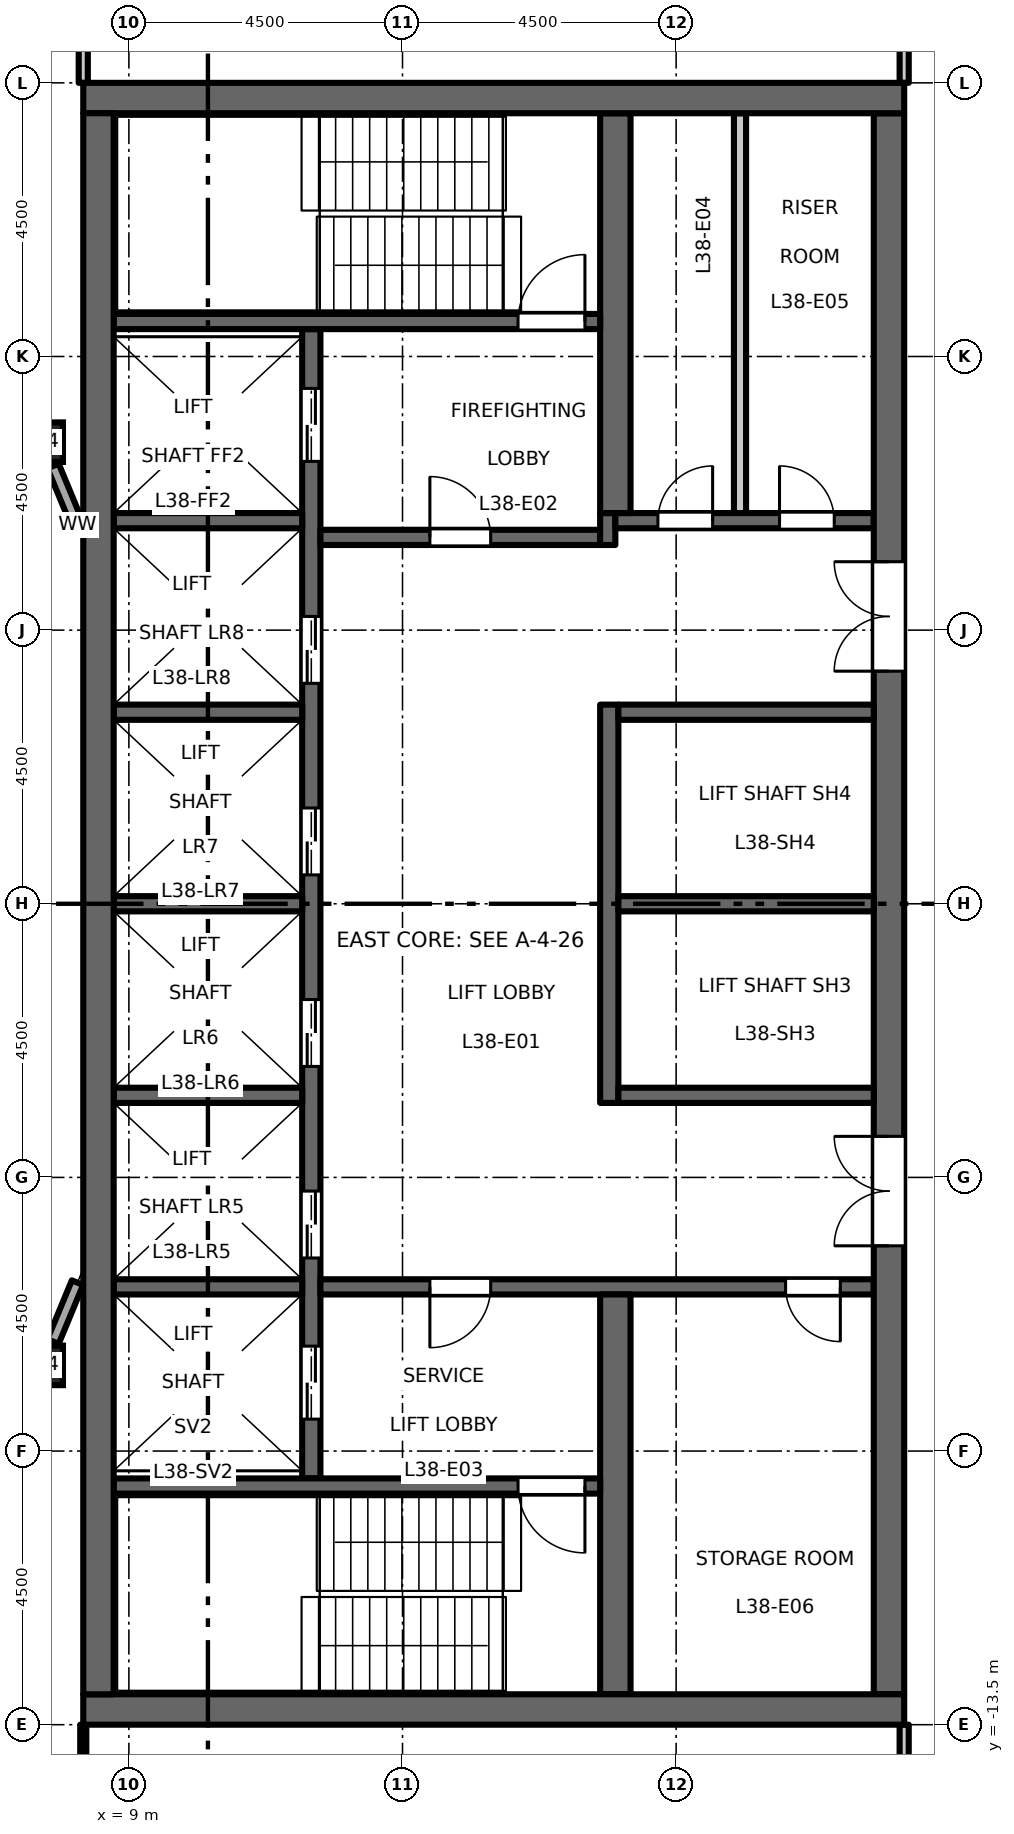
"""IFC4 building model, lengths in metres.
Left out: names, types, materials, properties, quantities, classifications, styles, units other than length and angle.
Written with IfcOpenShell. Run it as: python <this file> out.ifc"""

import sys

from ifc_helpers import new_model, si_unit, direction, frame, frame_2d, origin, origin_2d, place, context, subcontext, project, spatial, rectangle, hollow_rectangle, extrude, element, fill, save


model = new_model("IFC4")
c1 = context("Model", 3, precision=1e-05, world=origin(), true_north=direction((0.0, 1.0)))
c2 = subcontext(c1, "Body", "Model", "MODEL_VIEW")
j1 = project(units=[si_unit("LENGTHUNIT", "METRE"), si_unit("PLANEANGLEUNIT", "RADIAN")], contexts=[c1])
p1 = place(None, origin())
s1 = spatial("IfcSite", under=j1, at=p1, CompositionType="ELEMENT")
p2 = place(p1, origin())
s2 = spatial("IfcBuilding", under=s1, at=p2, CompositionType="ELEMENT")
p3 = place(p2, frame((0.0, 0.0, 176.7)))
s3 = spatial("IfcBuildingStorey", under=s2, at=p3, CompositionType="ELEMENT", Elevation=176.7)
for number, where, z_axis, x_axis in (
    (1, (7.591, -7.591, 0.0), (0.0, 0.0, 1.0), (1.0, 0.0, 0.0)),
    (2, (7.591, 7.591, 0.0), (0.0, 0.0, 1.0), (1.0, 0.0, 0.0)),
):
    element("IfcColumn", number, at=place(p3, frame(where, z_axis=z_axis, x_axis=x_axis)), inside=s3, PredefinedType="COLUMN", context=c2, shape_type="SweptSolid", body=[
        extrude(hollow_rectangle(XDim=0.65, YDim=0.65, WallThickness=0.036, at=origin_2d()), origin(), (0.0, 0.0, 1.0), 4.5),
    ])
p4 = place(p3, frame((12.0, -9.45, 0.0), z_axis=(0.0, 0.0, 1.0), x_axis=(0.0, 1.0, 0.0)))
e3 = element("IfcWall", 3, at=p4, inside=s3, PredefinedType="SHEAR", context=c2, shape_type="SweptSolid", body=[
    extrude(rectangle(XDim=18.9, YDim=0.3, at=frame_2d((9.45, 0.0))), origin(), (0.0, 0.0, 1.0), 4.3),
])
p5 = place(p4, frame((3.625, 0.0, 0.0)))
e4 = element("IfcOpeningElement", 4, at=p5, cuts=e3, PredefinedType="OPENING", context=c2, shape_type="SweptSolid", body=[
    extrude(rectangle(XDim=1.1, YDim=2.1, at=frame_2d((0.55, 1.05))), frame((0.0, 0.16, 0.0), z_axis=(0.0, -1.0, 0.0), x_axis=(1.0, 0.0, 0.0)), (0.0, 0.0, 1.0), 0.32),
])
p6 = place(p4, frame((6.775, 0.0, 0.0)))
e5 = element("IfcOpeningElement", 5, at=p6, cuts=e3, PredefinedType="OPENING", context=c2, shape_type="SweptSolid", body=[
    extrude(rectangle(XDim=1.1, YDim=2.1, at=frame_2d((0.55, 1.05))), frame((0.0, 0.16, 0.0), z_axis=(0.0, -1.0, 0.0), x_axis=(1.0, 0.0, 0.0)), (0.0, 0.0, 1.0), 0.32),
])
p7 = place(p4, frame((9.925, 0.0, 0.0)))
e6 = element("IfcOpeningElement", 6, at=p7, cuts=e3, PredefinedType="OPENING", context=c2, shape_type="SweptSolid", body=[
    extrude(rectangle(XDim=1.1, YDim=2.1, at=frame_2d((0.55, 1.05))), frame((0.0, 0.16, 0.0), z_axis=(0.0, -1.0, 0.0), x_axis=(1.0, 0.0, 0.0)), (0.0, 0.0, 1.0), 0.32),
])
p8 = place(p4, frame((13.075, 0.0, 0.0)))
e7 = element("IfcOpeningElement", 7, at=p8, cuts=e3, PredefinedType="OPENING", context=c2, shape_type="SweptSolid", body=[
    extrude(rectangle(XDim=1.1, YDim=2.1, at=frame_2d((0.55, 1.05))), frame((0.0, 0.16, 0.0), z_axis=(0.0, -1.0, 0.0), x_axis=(1.0, 0.0, 0.0)), (0.0, 0.0, 1.0), 0.32),
])
p9 = place(p4, frame((16.725, 0.0, 0.0)))
e8 = element("IfcOpeningElement", 8, at=p9, cuts=e3, PredefinedType="OPENING", context=c2, shape_type="SweptSolid", body=[
    extrude(rectangle(XDim=1.2, YDim=2.1, at=frame_2d((0.6, 1.05))), frame((0.0, 0.16, 0.0), z_axis=(0.0, -1.0, 0.0), x_axis=(1.0, 0.0, 0.0)), (0.0, 0.0, 1.0), 0.32),
])
p10 = place(p4, frame((0.975, 0.0, 0.0)))
e9 = element("IfcOpeningElement", 9, at=p10, cuts=e3, PredefinedType="OPENING", context=c2, shape_type="SweptSolid", body=[
    extrude(rectangle(XDim=1.2, YDim=2.1, at=frame_2d((0.6, 1.05))), frame((0.0, 0.16, 0.0), z_axis=(0.0, -1.0, 0.0), x_axis=(1.0, 0.0, 0.0)), (0.0, 0.0, 1.0), 0.32),
])
p11 = place(p3, frame((12.15, 6.025, 0.0), z_axis=(0.0, 0.0, 1.0), x_axis=(1.0, 0.0, 0.0)))
e10 = element("IfcWall", 10, at=p11, inside=s3, PredefinedType="SHEAR", context=c2, shape_type="SweptSolid", body=[
    extrude(rectangle(XDim=4.6, YDim=0.25, at=frame_2d((2.3, 0.0))), origin(), (0.0, 0.0, 1.0), 4.3),
])
p12 = place(p11, frame((1.8, 0.0, 0.0)))
e11 = element("IfcOpeningElement", 11, at=p12, cuts=e10, PredefinedType="OPENING", context=c2, shape_type="SweptSolid", body=[
    extrude(rectangle(XDim=1.0, YDim=2.1, at=frame_2d((0.5, 1.05))), frame((0.0, 0.135, 0.0), z_axis=(0.0, -1.0, 0.0), x_axis=(1.0, 0.0, 0.0)), (0.0, 0.0, 1.0), 0.27),
])
p13 = place(p3, frame((16.875, 5.9, 0.0), z_axis=(0.0, 0.0, 1.0), x_axis=(0.0, 1.0, 0.0)))
e12 = element("IfcWall", 12, at=p13, inside=s3, PredefinedType="SHEAR", context=c2, shape_type="SweptSolid", body=[
    extrude(rectangle(XDim=0.525, YDim=0.25, at=frame_2d((0.263, 0.0))), origin(), (0.0, 0.0, 1.0), 4.3),
])
p14 = place(p3, frame((17.0, 6.3, 0.0), z_axis=(0.0, 0.0, 1.0), x_axis=(1.0, 0.0, 0.0)))
e13 = element("IfcWall", 13, at=p14, inside=s3, PredefinedType="SHEAR", context=c2, shape_type="SweptSolid", body=[
    extrude(rectangle(XDim=4.25, YDim=0.25, at=frame_2d((2.125, 0.0))), origin(), (0.0, 0.0, 1.0), 4.3),
])
p15 = place(p14, frame((0.7, 0.0, 0.0)))
e14 = element("IfcOpeningElement", 14, at=p15, cuts=e13, PredefinedType="OPENING", context=c2, shape_type="SweptSolid", body=[
    extrude(rectangle(XDim=0.9, YDim=2.1, at=frame_2d((0.45, 1.05))), frame((0.0, 0.135, 0.0), z_axis=(0.0, -1.0, 0.0), x_axis=(1.0, 0.0, 0.0)), (0.0, 0.0, 1.0), 0.27),
])
p16 = place(p14, frame((2.7, 0.0, 0.0)))
e15 = element("IfcOpeningElement", 15, at=p16, cuts=e13, PredefinedType="OPENING", context=c2, shape_type="SweptSolid", body=[
    extrude(rectangle(XDim=0.9, YDim=2.1, at=frame_2d((0.45, 1.05))), frame((0.0, 0.135, 0.0), z_axis=(0.0, -1.0, 0.0), x_axis=(1.0, 0.0, 0.0)), (0.0, 0.0, 1.0), 0.27),
])
p17 = place(p3, frame((12.15, -6.3, 0.0), z_axis=(0.0, 0.0, 1.0), x_axis=(1.0, 0.0, 0.0)))
e16 = element("IfcWall", 16, at=p17, inside=s3, PredefinedType="SHEAR", context=c2, shape_type="SweptSolid", body=[
    extrude(rectangle(XDim=9.1, YDim=0.25, at=frame_2d((4.55, 0.0))), origin(), (0.0, 0.0, 1.0), 4.3),
])
p18 = place(p17, frame((1.8, 0.0, 0.0)))
e17 = element("IfcOpeningElement", 17, at=p18, cuts=e16, PredefinedType="OPENING", context=c2, shape_type="SweptSolid", body=[
    extrude(rectangle(XDim=1.0, YDim=2.1, at=frame_2d((0.5, 1.05))), frame((0.0, 0.135, 0.0), z_axis=(0.0, -1.0, 0.0), x_axis=(1.0, 0.0, 0.0)), (0.0, 0.0, 1.0), 0.27),
])
p19 = place(p17, frame((7.65, 0.0, 0.0)))
e18 = element("IfcOpeningElement", 18, at=p19, cuts=e16, PredefinedType="OPENING", context=c2, shape_type="SweptSolid", body=[
    extrude(rectangle(XDim=0.9, YDim=2.1, at=frame_2d((0.45, 1.05))), frame((0.0, 0.135, 0.0), z_axis=(0.0, -1.0, 0.0), x_axis=(1.0, 0.0, 0.0)), (0.0, 0.0, 1.0), 0.27),
])
p20 = place(p3, frame((21.5, -13.0, 0.0), z_axis=(0.0, 0.0, 1.0), x_axis=(0.0, 1.0, 0.0)))
e19 = element("IfcWall", 19, at=p20, inside=s3, PredefinedType="SHEAR", context=c2, shape_type="SweptSolid", body=[
    extrude(rectangle(XDim=26.0, YDim=0.5, at=frame_2d((13.0, 0.0))), origin(), (0.0, 0.0, 1.0), 4.3),
])
p21 = place(p20, frame((16.825, 0.0, 0.0)))
e20 = element("IfcOpeningElement", 20, at=p21, cuts=e19, PredefinedType="OPENING", context=c2, shape_type="SweptSolid", body=[
    extrude(rectangle(XDim=1.8, YDim=2.1, at=frame_2d((0.9, 1.05))), frame((0.0, 0.26, 0.0), z_axis=(0.0, -1.0, 0.0), x_axis=(1.0, 0.0, 0.0)), (0.0, 0.0, 1.0), 0.52),
])
p22 = place(p20, frame((7.375, 0.0, 0.0)))
e21 = element("IfcOpeningElement", 21, at=p22, cuts=e19, PredefinedType="OPENING", context=c2, shape_type="SweptSolid", body=[
    extrude(rectangle(XDim=1.8, YDim=2.1, at=frame_2d((0.9, 1.05))), frame((0.0, 0.26, 0.0), z_axis=(0.0, -1.0, 0.0), x_axis=(1.0, 0.0, 0.0)), (0.0, 0.0, 1.0), 0.52),
])
p23 = place(p3, frame((19.05, 6.425, 0.0), z_axis=(0.0, 0.0, 1.0), x_axis=(0.0, 1.0, 0.0)))
e22 = element("IfcWall", 22, at=p23, inside=s3, PredefinedType="PARTITIONING", context=c2, shape_type="SweptSolid", body=[
    extrude(rectangle(XDim=6.575, YDim=0.2, at=frame_2d((3.288, 0.0))), origin(), (0.0, 0.0, 1.0), 4.3),
])
p24 = place(p3, frame((16.9, -3.275, 0.0), z_axis=(0.0, 0.0, 1.0), x_axis=(0.0, 1.0, 0.0)))
e23 = element("IfcWall", 23, at=p24, inside=s3, PredefinedType="SHEAR", context=c2, shape_type="SweptSolid", body=[
    extrude(rectangle(XDim=6.55, YDim=0.3, at=frame_2d((3.275, 0.0))), origin(), (0.0, 0.0, 1.0), 4.3),
])
for number, where, z_axis, x_axis in (
    (24, (17.05, 0.0, 0.0), (0.0, 0.0, 1.0), (1.0, 0.0, 0.0)),
    (25, (17.05, 3.15, 0.0), (0.0, 0.0, 1.0), (1.0, 0.0, 0.0)),
    (26, (17.05, -3.15, 0.0), (0.0, 0.0, 1.0), (1.0, 0.0, 0.0)),
):
    element("IfcWall", number, at=place(p3, frame(where, z_axis=z_axis, x_axis=x_axis)), inside=s3, PredefinedType="SHEAR", context=c2, shape_type="SweptSolid", body=[
        extrude(rectangle(XDim=4.2, YDim=0.25, at=frame_2d((2.1, 0.0))), origin(), (0.0, 0.0, 1.0), 4.3),
    ])
for number, where, z_axis, x_axis in (
    (27, (17.0, 6.425, 0.0), (0.0, 0.0, 1.0), (0.0, 1.0, 0.0)),
    (28, (17.0, -13.0, 0.0), (0.0, 0.0, 1.0), (0.0, 1.0, 0.0)),
):
    element("IfcWall", number, at=place(p3, frame(where, z_axis=z_axis, x_axis=x_axis)), inside=s3, PredefinedType="SHEAR", context=c2, shape_type="SweptSolid", body=[
        extrude(rectangle(XDim=6.575, YDim=0.5, at=frame_2d((3.288, 0.0))), origin(), (0.0, 0.0, 1.0), 4.3),
    ])
for number, where, z_axis, x_axis in (
    (29, (8.75, 0.0, 0.0), (0.0, 0.0, 1.0), (1.0, 0.0, 0.0)),
    (30, (8.75, 3.15, 0.0), (0.0, 0.0, 1.0), (1.0, 0.0, 0.0)),
    (31, (8.75, 6.3, 0.0), (0.0, 0.0, 1.0), (1.0, 0.0, 0.0)),
    (32, (8.75, -3.15, 0.0), (0.0, 0.0, 1.0), (1.0, 0.0, 0.0)),
    (33, (8.75, -6.3, 0.0), (0.0, 0.0, 1.0), (1.0, 0.0, 0.0)),
):
    element("IfcWall", number, at=place(p3, frame(where, z_axis=z_axis, x_axis=x_axis)), inside=s3, PredefinedType="SHEAR", context=c2, shape_type="SweptSolid", body=[
        extrude(rectangle(XDim=3.1, YDim=0.25, at=frame_2d((1.55, 0.0))), origin(), (0.0, 0.0, 1.0), 4.3),
    ])
p25 = place(p3, frame((8.75, 9.575, 0.0), z_axis=(0.0, 0.0, 1.0), x_axis=(1.0, 0.0, 0.0)))
e34 = element("IfcWall", 34, at=p25, inside=s3, PredefinedType="SHEAR", context=c2, shape_type="SweptSolid", body=[
    extrude(rectangle(XDim=8.0, YDim=0.25, at=frame_2d((4.0, 0.0))), origin(), (0.0, 0.0, 1.0), 4.3),
])
p26 = place(p25, frame((6.65, 0.0, 0.0)))
e35 = element("IfcOpeningElement", 35, at=p26, cuts=e34, PredefinedType="OPENING", context=c2, shape_type="SweptSolid", body=[
    extrude(rectangle(XDim=1.1, YDim=2.1, at=frame_2d((0.55, 1.05))), frame((0.0, 0.135, 0.0), z_axis=(0.0, -1.0, 0.0), x_axis=(1.0, 0.0, 0.0)), (0.0, 0.0, 1.0), 0.27),
])
p27 = place(p3, frame((8.75, -9.575, 0.0), z_axis=(0.0, 0.0, 1.0), x_axis=(1.0, 0.0, 0.0)))
e36 = element("IfcWall", 36, at=p27, inside=s3, PredefinedType="SHEAR", context=c2, shape_type="SweptSolid", body=[
    extrude(rectangle(XDim=8.0, YDim=0.25, at=frame_2d((4.0, 0.0))), origin(), (0.0, 0.0, 1.0), 4.3),
])
p28 = place(p27, frame((6.65, 0.0, 0.0)))
e37 = element("IfcOpeningElement", 37, at=p28, cuts=e36, PredefinedType="OPENING", context=c2, shape_type="SweptSolid", body=[
    extrude(rectangle(XDim=1.1, YDim=2.1, at=frame_2d((0.55, 1.05))), frame((0.0, 0.135, 0.0), z_axis=(0.0, -1.0, 0.0), x_axis=(1.0, 0.0, 0.0)), (0.0, 0.0, 1.0), 0.27),
])
for number, where, z_axis, x_axis in (
    (38, (8.25, 13.25, 0.0), (0.0, 0.0, 1.0), (1.0, 0.0, 0.0)),
    (39, (8.25, -13.25, 0.0), (0.0, 0.0, 1.0), (1.0, 0.0, 0.0)),
):
    element("IfcWall", number, at=place(p3, frame(where, z_axis=z_axis, x_axis=x_axis)), inside=s3, PredefinedType="SHEAR", context=c2, shape_type="SweptSolid", body=[
        extrude(rectangle(XDim=13.5, YDim=0.5, at=frame_2d((6.75, 0.0))), origin(), (0.0, 0.0, 1.0), 4.3),
    ])
p29 = place(p3, frame((8.5, -13.0, 0.0), z_axis=(0.0, 0.0, 1.0), x_axis=(0.0, 1.0, 0.0)))
e40 = element("IfcWall", 40, at=p29, inside=s3, PredefinedType="SHEAR", context=c2, shape_type="SweptSolid", body=[
    extrude(rectangle(XDim=26.0, YDim=0.5, at=frame_2d((13.0, 0.0))), origin(), (0.0, 0.0, 1.0), 4.3),
])
for number, where, z_axis, x_axis in (
    (41, (7.753, -7.199, 0.0), (0.0, 0.0, 1.0), (0.383, 0.924, 0.0)),
    (42, (8.154, 6.231, 0.0), (0.0, 0.0, 1.0), (-0.383, 0.924, 0.0)),
):
    element("IfcWall", number, at=place(p3, frame(where, z_axis=z_axis, x_axis=x_axis)), inside=s3, PredefinedType="STANDARD", context=c2, shape_type="SweptSolid", body=[
        extrude(rectangle(XDim=1.048, YDim=0.2, at=frame_2d((0.524, 0.0))), origin(), (0.0, 0.0, 1.0), 3.776),
    ])
p30 = place(p3, frame((8.25, -18.925, 0.0), z_axis=(0.0, 0.0, 1.0), x_axis=(0.0, 1.0, 0.0)))
e43 = element("IfcWall", 43, at=p30, inside=s3, PredefinedType="PARTITIONING", context=c2, shape_type="SweptSolid", body=[
    extrude(rectangle(XDim=5.425, YDim=0.1, at=frame_2d((2.712, 0.0))), origin(), (0.0, 0.0, 1.0), 4.3),
])
p31 = place(p3, frame((8.25, 13.5, 0.0), z_axis=(0.0, 0.0, 1.0), x_axis=(0.0, 1.0, 0.0)))
e44 = element("IfcWall", 44, at=p31, inside=s3, PredefinedType="PARTITIONING", context=c2, shape_type="SweptSolid", body=[
    extrude(rectangle(XDim=3.3, YDim=0.15, at=frame_2d((1.65, 0.0))), origin(), (0.0, 0.0, 1.0), 4.3),
])
for number, where, z_axis, x_axis in (
    (45, (21.75, -18.925, 0.0), (0.0, 0.0, 1.0), (0.0, 1.0, 0.0)),
    (46, (21.75, 13.5, 0.0), (0.0, 0.0, 1.0), (0.0, 1.0, 0.0)),
):
    element("IfcWall", number, at=place(p3, frame(where, z_axis=z_axis, x_axis=x_axis)), inside=s3, PredefinedType="PARTITIONING", context=c2, shape_type="SweptSolid", body=[
        extrude(rectangle(XDim=5.425, YDim=0.15, at=frame_2d((2.712, 0.0))), origin(), (0.0, 0.0, 1.0), 4.3),
    ])
p32 = place(p12, origin())
e47 = element("IfcDoor", 47, at=p32, inside=s3, OperationType="SINGLE_SWING_RIGHT", PredefinedType="DOOR", context=c2, shape_type="SweptSolid", body=[
    extrude(rectangle(XDim=1.0, YDim=2.1, at=frame_2d((0.5, 1.05))), frame((0.0, 0.025, 0.0), z_axis=(0.0, -1.0, 0.0), x_axis=(1.0, 0.0, 0.0)), (0.0, 0.0, 1.0), 0.05),
])
fill(e11, e47)
p33 = place(p18, origin())
e48 = element("IfcDoor", 48, at=p33, inside=s3, OperationType="SINGLE_SWING_LEFT", PredefinedType="DOOR", context=c2, shape_type="SweptSolid", body=[
    extrude(rectangle(XDim=1.0, YDim=2.1, at=frame_2d((0.5, 1.05))), frame((0.0, 0.025, 0.0), z_axis=(0.0, -1.0, 0.0), x_axis=(1.0, 0.0, 0.0)), (0.0, 0.0, 1.0), 0.05),
])
fill(e17, e48)
p34 = place(p26, origin())
e49 = element("IfcDoor", 49, at=p34, inside=s3, OperationType="SINGLE_SWING_LEFT", PredefinedType="DOOR", context=c2, shape_type="SweptSolid", body=[
    extrude(rectangle(XDim=1.1, YDim=2.1, at=frame_2d((0.55, 1.05))), frame((0.0, 0.025, 0.0), z_axis=(0.0, -1.0, 0.0), x_axis=(1.0, 0.0, 0.0)), (0.0, 0.0, 1.0), 0.05),
])
fill(e35, e49)
p35 = place(p28, origin())
e50 = element("IfcDoor", 50, at=p35, inside=s3, OperationType="SINGLE_SWING_RIGHT", PredefinedType="DOOR", context=c2, shape_type="SweptSolid", body=[
    extrude(rectangle(XDim=1.1, YDim=2.1, at=frame_2d((0.55, 1.05))), frame((0.0, 0.025, 0.0), z_axis=(0.0, -1.0, 0.0), x_axis=(1.0, 0.0, 0.0)), (0.0, 0.0, 1.0), 0.05),
])
fill(e37, e50)
p36 = place(p21, origin())
e51 = element("IfcDoor", 51, at=p36, inside=s3, OperationType="DOUBLE_DOOR_DOUBLE_SWING", PredefinedType="DOOR", context=c2, shape_type="SweptSolid", body=[
    extrude(rectangle(XDim=1.8, YDim=2.1, at=frame_2d((0.9, 1.05))), frame((0.0, 0.025, 0.0), z_axis=(0.0, -1.0, 0.0), x_axis=(1.0, 0.0, 0.0)), (0.0, 0.0, 1.0), 0.05),
])
fill(e20, e51)
p37 = place(p22, origin())
e52 = element("IfcDoor", 52, at=p37, inside=s3, OperationType="DOUBLE_DOOR_DOUBLE_SWING", PredefinedType="DOOR", context=c2, shape_type="SweptSolid", body=[
    extrude(rectangle(XDim=1.8, YDim=2.1, at=frame_2d((0.9, 1.05))), frame((0.0, 0.025, 0.0), z_axis=(0.0, -1.0, 0.0), x_axis=(1.0, 0.0, 0.0)), (0.0, 0.0, 1.0), 0.05),
])
fill(e21, e52)
p38 = place(p5, origin())
e53 = element("IfcDoor", 53, at=p38, inside=s3, OperationType="DOUBLE_DOOR_SLIDING", PredefinedType="DOOR", context=c2, shape_type="SweptSolid", body=[
    extrude(rectangle(XDim=1.1, YDim=2.1, at=frame_2d((0.55, 1.05))), frame((0.0, 0.025, 0.0), z_axis=(0.0, -1.0, 0.0), x_axis=(1.0, 0.0, 0.0)), (0.0, 0.0, 1.0), 0.05),
])
fill(e4, e53)
p39 = place(p6, origin())
e54 = element("IfcDoor", 54, at=p39, inside=s3, OperationType="DOUBLE_DOOR_SLIDING", PredefinedType="DOOR", context=c2, shape_type="SweptSolid", body=[
    extrude(rectangle(XDim=1.1, YDim=2.1, at=frame_2d((0.55, 1.05))), frame((0.0, 0.025, 0.0), z_axis=(0.0, -1.0, 0.0), x_axis=(1.0, 0.0, 0.0)), (0.0, 0.0, 1.0), 0.05),
])
fill(e5, e54)
p40 = place(p7, origin())
e55 = element("IfcDoor", 55, at=p40, inside=s3, OperationType="DOUBLE_DOOR_SLIDING", PredefinedType="DOOR", context=c2, shape_type="SweptSolid", body=[
    extrude(rectangle(XDim=1.1, YDim=2.1, at=frame_2d((0.55, 1.05))), frame((0.0, 0.025, 0.0), z_axis=(0.0, -1.0, 0.0), x_axis=(1.0, 0.0, 0.0)), (0.0, 0.0, 1.0), 0.05),
])
fill(e6, e55)
p41 = place(p8, origin())
e56 = element("IfcDoor", 56, at=p41, inside=s3, OperationType="DOUBLE_DOOR_SLIDING", PredefinedType="DOOR", context=c2, shape_type="SweptSolid", body=[
    extrude(rectangle(XDim=1.1, YDim=2.1, at=frame_2d((0.55, 1.05))), frame((0.0, 0.025, 0.0), z_axis=(0.0, -1.0, 0.0), x_axis=(1.0, 0.0, 0.0)), (0.0, 0.0, 1.0), 0.05),
])
fill(e7, e56)
p42 = place(p9, origin())
e57 = element("IfcDoor", 57, at=p42, inside=s3, OperationType="DOUBLE_DOOR_SLIDING", PredefinedType="DOOR", context=c2, shape_type="SweptSolid", body=[
    extrude(rectangle(XDim=1.2, YDim=2.1, at=frame_2d((0.6, 1.05))), frame((0.0, 0.025, 0.0), z_axis=(0.0, -1.0, 0.0), x_axis=(1.0, 0.0, 0.0)), (0.0, 0.0, 1.0), 0.05),
])
fill(e8, e57)
p43 = place(p10, origin())
e58 = element("IfcDoor", 58, at=p43, inside=s3, OperationType="DOUBLE_DOOR_SLIDING", PredefinedType="DOOR", context=c2, shape_type="SweptSolid", body=[
    extrude(rectangle(XDim=1.2, YDim=2.1, at=frame_2d((0.6, 1.05))), frame((0.0, 0.025, 0.0), z_axis=(0.0, -1.0, 0.0), x_axis=(1.0, 0.0, 0.0)), (0.0, 0.0, 1.0), 0.05),
])
fill(e9, e58)
p44 = place(p15, origin())
e59 = element("IfcDoor", 59, at=p44, inside=s3, OperationType="SINGLE_SWING_LEFT", PredefinedType="DOOR", context=c2, shape_type="SweptSolid", body=[
    extrude(rectangle(XDim=0.9, YDim=2.1, at=frame_2d((0.45, 1.05))), frame((0.0, 0.025, 0.0), z_axis=(0.0, -1.0, 0.0), x_axis=(1.0, 0.0, 0.0)), (0.0, 0.0, 1.0), 0.05),
])
fill(e14, e59)
p45 = place(p16, origin())
e60 = element("IfcDoor", 60, at=p45, inside=s3, OperationType="SINGLE_SWING_RIGHT", PredefinedType="DOOR", context=c2, shape_type="SweptSolid", body=[
    extrude(rectangle(XDim=0.9, YDim=2.1, at=frame_2d((0.45, 1.05))), frame((0.0, 0.025, 0.0), z_axis=(0.0, -1.0, 0.0), x_axis=(1.0, 0.0, 0.0)), (0.0, 0.0, 1.0), 0.05),
])
fill(e15, e60)
p46 = place(p19, origin())
e61 = element("IfcDoor", 61, at=p46, inside=s3, OperationType="SINGLE_SWING_RIGHT", PredefinedType="DOOR", context=c2, shape_type="SweptSolid", body=[
    extrude(rectangle(XDim=0.9, YDim=2.1, at=frame_2d((0.45, 1.05))), frame((0.0, 0.025, 0.0), z_axis=(0.0, -1.0, 0.0), x_axis=(1.0, 0.0, 0.0)), (0.0, 0.0, 1.0), 0.05),
])
fill(e18, e61)
save(model, sys.argv[1])
